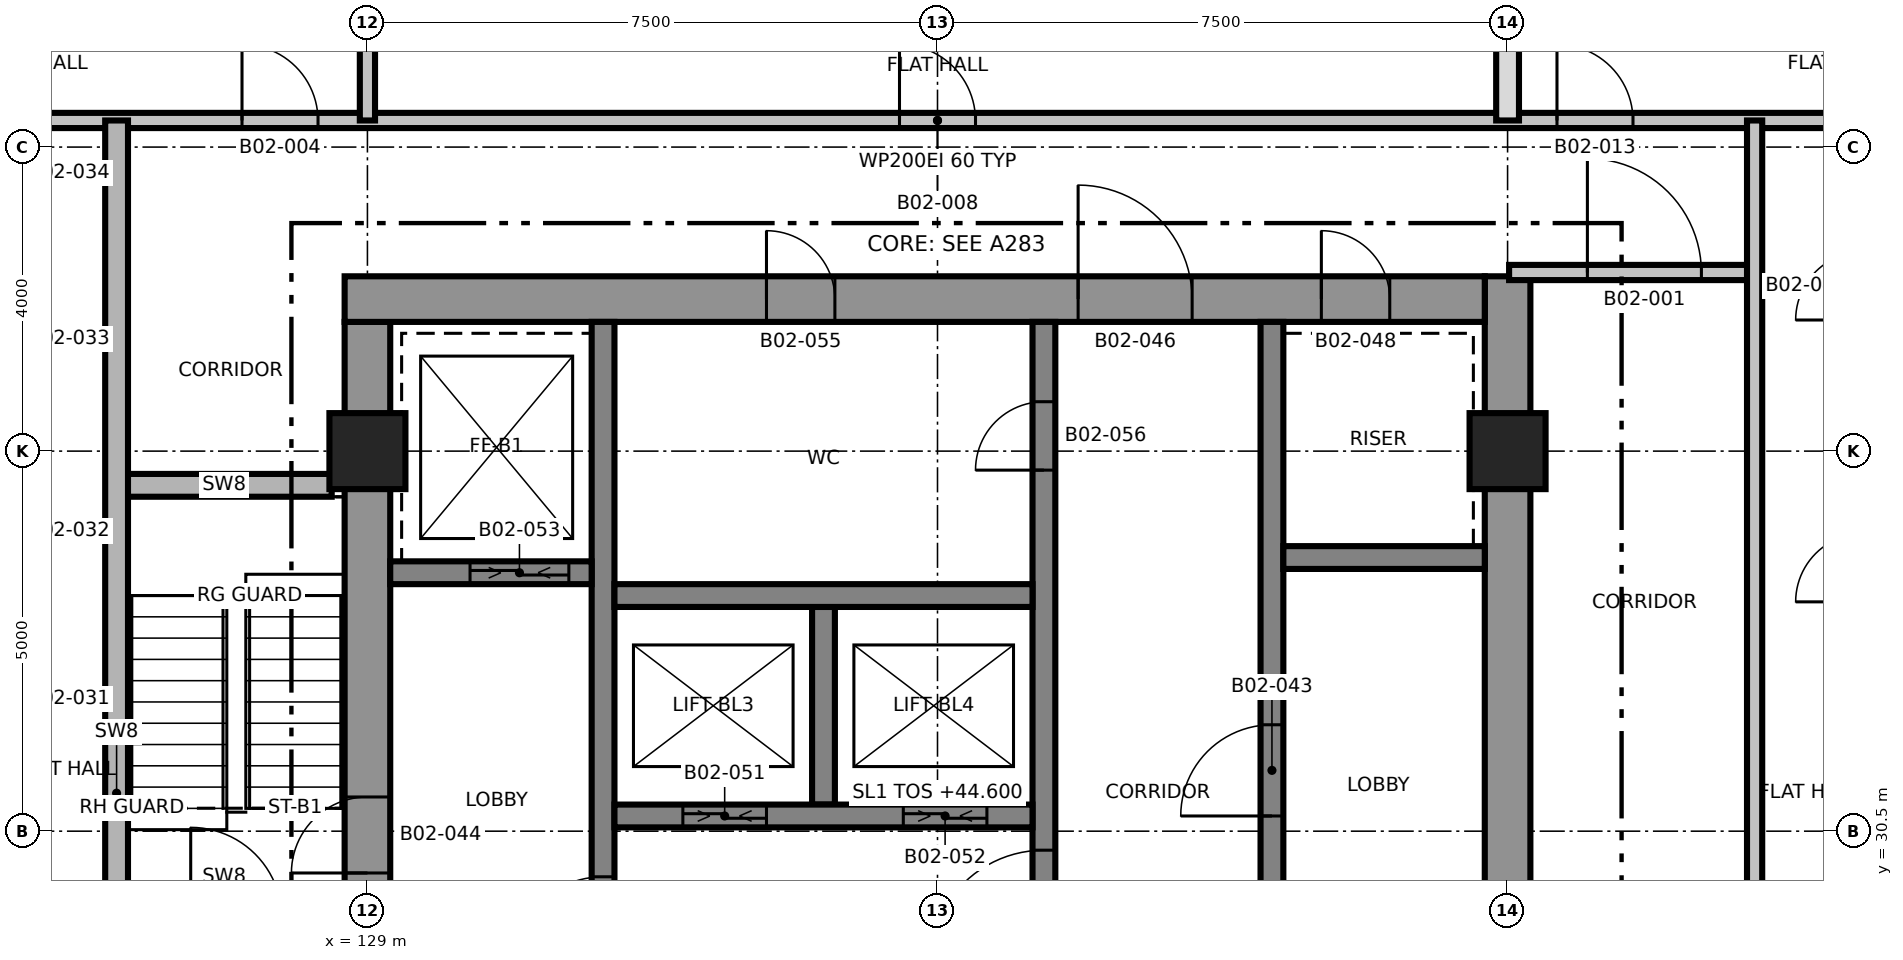
"""IFC4 building model, lengths in metres.
Left out: names, types, materials, properties, quantities, classifications, styles, units other than length and angle.
Written with IfcOpenShell. Run it as: python <this file> out.ifc"""

import sys

from ifc_helpers import new_model, si_unit, direction, frame, frame_2d, origin, origin_2d, place, context, subcontext, project, spatial, rectangle, extrude, element, fill, save


model = new_model("IFC4")
c1 = context("Model", 3, precision=1e-05, world=origin(), true_north=direction((0.0, 1.0)))
c2 = subcontext(c1, "Body", "Model", "MODEL_VIEW")
j1 = project(units=[si_unit("LENGTHUNIT", "METRE"), si_unit("PLANEANGLEUNIT", "RADIAN")], contexts=[c1])
p1 = place(None, origin())
s1 = spatial("IfcSite", under=j1, at=p1, CompositionType="ELEMENT")
p2 = place(p1, origin())
s2 = spatial("IfcBuilding", under=s1, at=p2, CompositionType="ELEMENT")
p3 = place(p2, frame((0.0, 0.0, 44.6)))
s3 = spatial("IfcBuildingStorey", under=s2, at=p3, CompositionType="ELEMENT", Elevation=44.6)
p4 = place(p3, frame((129.0, 24.8, 0.0), z_axis=(0.0, 0.0, 1.0), x_axis=(0.0, 1.0, 0.0)))
e1 = element("IfcWall", 1, at=p4, inside=s3, PredefinedType="SHEAR", context=c2, shape_type="SweptSolid", body=[
    extrude(rectangle(XDim=12.4, YDim=0.6, at=frame_2d((6.2, 0.0))), origin(), (0.0, 0.0, 1.0), 3.7),
])
p5 = place(p4, frame((5.15, 0.0, 0.0)))
e2 = element("IfcOpeningElement", 2, at=p5, cuts=e1, PredefinedType="OPENING", context=c2, shape_type="SweptSolid", body=[
    extrude(rectangle(XDim=1.0, YDim=2.1, at=frame_2d((0.5, 1.05))), frame((0.0, 0.31, 0.0), z_axis=(0.0, -1.0, 0.0), x_axis=(1.0, 0.0, 0.0)), (0.0, 0.0, 1.0), 0.62),
])
p6 = place(p3, frame((144.0, 24.2, 0.0), z_axis=(0.0, 0.0, 1.0), x_axis=(0.0, 1.0, 0.0)))
e3 = element("IfcWall", 3, at=p6, inside=s3, PredefinedType="SHEAR", context=c2, shape_type="SweptSolid", body=[
    extrude(rectangle(XDim=13.6, YDim=0.6, at=frame_2d((6.8, 0.0))), origin(), (0.0, 0.0, 1.0), 3.7),
])
p7 = place(p3, frame((128.7, 37.5, 0.0), z_axis=(0.0, 0.0, 1.0), x_axis=(1.0, 0.0, 0.0)))
e4 = element("IfcWall", 4, at=p7, inside=s3, PredefinedType="SHEAR", context=c2, shape_type="SweptSolid", body=[
    extrude(rectangle(XDim=15.0, YDim=0.6, at=frame_2d((7.5, 0.0))), origin(), (0.0, 0.0, 1.0), 3.7),
])
p8 = place(p7, frame((9.65, 0.0, 0.0)))
e5 = element("IfcOpeningElement", 5, at=p8, cuts=e4, PredefinedType="OPENING", context=c2, shape_type="SweptSolid", body=[
    extrude(rectangle(XDim=1.5, YDim=2.1, at=frame_2d((0.75, 1.05))), frame((0.0, 0.31, 0.0), z_axis=(0.0, -1.0, 0.0), x_axis=(1.0, 0.0, 0.0)), (0.0, 0.0, 1.0), 0.62),
])
p9 = place(p7, frame((12.85, 0.0, 0.0)))
e6 = element("IfcOpeningElement", 6, at=p9, cuts=e4, PredefinedType="OPENING", context=c2, shape_type="SweptSolid", body=[
    extrude(rectangle(XDim=0.9, YDim=2.1, at=frame_2d((0.45, 1.05))), frame((0.0, 0.31, 0.0), z_axis=(0.0, -1.0, 0.0), x_axis=(1.0, 0.0, 0.0)), (0.0, 0.0, 1.0), 0.62),
])
p10 = place(p7, frame((5.55, 0.0, 0.0)))
e7 = element("IfcOpeningElement", 7, at=p10, cuts=e4, PredefinedType="OPENING", context=c2, shape_type="SweptSolid", body=[
    extrude(rectangle(XDim=0.9, YDim=2.1, at=frame_2d((0.45, 1.05))), frame((0.0, 0.31, 0.0), z_axis=(0.0, -1.0, 0.0), x_axis=(1.0, 0.0, 0.0)), (0.0, 0.0, 1.0), 0.62),
])
p11 = place(p3, frame((132.1, 24.8, 0.0), z_axis=(0.0, 0.0, 1.0), x_axis=(0.0, 1.0, 0.0)))
e8 = element("IfcWall", 8, at=p11, inside=s3, PredefinedType="SHEAR", context=c2, shape_type="SweptSolid", body=[
    extrude(rectangle(XDim=12.4, YDim=0.3, at=frame_2d((6.2, 0.0))), origin(), (0.0, 0.0, 1.0), 3.7),
])
p12 = place(p11, frame((3.9, 0.0, 0.0)))
e9 = element("IfcOpeningElement", 9, at=p12, cuts=e8, PredefinedType="OPENING", context=c2, shape_type="SweptSolid", body=[
    extrude(rectangle(XDim=1.2, YDim=2.1, at=frame_2d((0.6, 1.05))), frame((0.0, 0.16, 0.0), z_axis=(0.0, -1.0, 0.0), x_axis=(1.0, 0.0, 0.0)), (0.0, 0.0, 1.0), 0.32),
])
p13 = place(p3, frame((137.9, 24.8, 0.0), z_axis=(0.0, 0.0, 1.0), x_axis=(0.0, 1.0, 0.0)))
e10 = element("IfcWall", 10, at=p13, inside=s3, PredefinedType="SHEAR", context=c2, shape_type="SweptSolid", body=[
    extrude(rectangle(XDim=12.4, YDim=0.3, at=frame_2d((6.2, 0.0))), origin(), (0.0, 0.0, 1.0), 3.7),
])
p14 = place(p13, frame((3.95, 0.0, 0.0)))
e11 = element("IfcOpeningElement", 11, at=p14, cuts=e10, PredefinedType="OPENING", context=c2, shape_type="SweptSolid", body=[
    extrude(rectangle(XDim=1.5, YDim=2.1, at=frame_2d((0.75, 1.05))), frame((0.0, 0.16, 0.0), z_axis=(0.0, -1.0, 0.0), x_axis=(1.0, 0.0, 0.0)), (0.0, 0.0, 1.0), 0.32),
])
p15 = place(p13, frame((10.45, 0.0, 0.0)))
e12 = element("IfcOpeningElement", 12, at=p15, cuts=e10, PredefinedType="OPENING", context=c2, shape_type="SweptSolid", body=[
    extrude(rectangle(XDim=0.9, YDim=2.1, at=frame_2d((0.45, 1.05))), frame((0.0, 0.16, 0.0), z_axis=(0.0, -1.0, 0.0), x_axis=(1.0, 0.0, 0.0)), (0.0, 0.0, 1.0), 0.32),
])
p16 = place(p3, frame((140.9, 24.8, 0.0), z_axis=(0.0, 0.0, 1.0), x_axis=(0.0, 1.0, 0.0)))
e13 = element("IfcWall", 13, at=p16, inside=s3, PredefinedType="SHEAR", context=c2, shape_type="SweptSolid", body=[
    extrude(rectangle(XDim=12.4, YDim=0.3, at=frame_2d((6.2, 0.0))), origin(), (0.0, 0.0, 1.0), 3.7),
])
p17 = place(p16, frame((5.9, 0.0, 0.0)))
e14 = element("IfcOpeningElement", 14, at=p17, cuts=e13, PredefinedType="OPENING", context=c2, shape_type="SweptSolid", body=[
    extrude(rectangle(XDim=1.2, YDim=2.1, at=frame_2d((0.6, 1.05))), frame((0.0, 0.16, 0.0), z_axis=(0.0, -1.0, 0.0), x_axis=(1.0, 0.0, 0.0)), (0.0, 0.0, 1.0), 0.32),
])
p18 = place(p3, frame((135.0, 30.85, 0.0), z_axis=(0.0, 0.0, 1.0), x_axis=(0.0, 1.0, 0.0)))
e15 = element("IfcWall", 15, at=p18, inside=s3, PredefinedType="SHEAR", context=c2, shape_type="SweptSolid", body=[
    extrude(rectangle(XDim=2.6, YDim=0.3, at=frame_2d((1.3, 0.0))), origin(), (0.0, 0.0, 1.0), 3.7),
])
p19 = place(p3, frame((132.25, 30.7, 0.0), z_axis=(0.0, 0.0, 1.0), x_axis=(1.0, 0.0, 0.0)))
e16 = element("IfcWall", 16, at=p19, inside=s3, PredefinedType="SHEAR", context=c2, shape_type="SweptSolid", body=[
    extrude(rectangle(XDim=5.5, YDim=0.3, at=frame_2d((2.75, 0.0))), origin(), (0.0, 0.0, 1.0), 3.7),
])
p20 = place(p19, frame((0.9, 0.0, 0.0)))
e17 = element("IfcOpeningElement", 17, at=p20, cuts=e16, PredefinedType="OPENING", context=c2, shape_type="SweptSolid", body=[
    extrude(rectangle(XDim=1.1, YDim=2.4, at=frame_2d((0.55, 1.2))), frame((0.0, 0.16, 0.0), z_axis=(0.0, -1.0, 0.0), x_axis=(1.0, 0.0, 0.0)), (0.0, 0.0, 1.0), 0.32),
])
p21 = place(p19, frame((3.8, 0.0, 0.0)))
e18 = element("IfcOpeningElement", 18, at=p21, cuts=e16, PredefinedType="OPENING", context=c2, shape_type="SweptSolid", body=[
    extrude(rectangle(XDim=1.1, YDim=2.4, at=frame_2d((0.55, 1.2))), frame((0.0, 0.16, 0.0), z_axis=(0.0, -1.0, 0.0), x_axis=(1.0, 0.0, 0.0)), (0.0, 0.0, 1.0), 0.32),
])
p22 = place(p3, frame((132.25, 33.6, 0.0), z_axis=(0.0, 0.0, 1.0), x_axis=(1.0, 0.0, 0.0)))
e19 = element("IfcWall", 19, at=p22, inside=s3, PredefinedType="SHEAR", context=c2, shape_type="SweptSolid", body=[
    extrude(rectangle(XDim=5.5, YDim=0.3, at=frame_2d((2.75, 0.0))), origin(), (0.0, 0.0, 1.0), 3.7),
])
p23 = place(p3, frame((129.3, 33.9, 0.0), z_axis=(0.0, 0.0, 1.0), x_axis=(1.0, 0.0, 0.0)))
e20 = element("IfcWall", 20, at=p23, inside=s3, PredefinedType="SHEAR", context=c2, shape_type="SweptSolid", body=[
    extrude(rectangle(XDim=2.65, YDim=0.3, at=frame_2d((1.325, 0.0))), origin(), (0.0, 0.0, 1.0), 3.7),
])
p24 = place(p23, frame((1.05, 0.0, 0.0)))
e21 = element("IfcOpeningElement", 21, at=p24, cuts=e20, PredefinedType="OPENING", context=c2, shape_type="SweptSolid", body=[
    extrude(rectangle(XDim=1.3, YDim=2.4, at=frame_2d((0.65, 1.2))), frame((0.0, 0.16, 0.0), z_axis=(0.0, -1.0, 0.0), x_axis=(1.0, 0.0, 0.0)), (0.0, 0.0, 1.0), 0.32),
])
p25 = place(p3, frame((141.05, 34.1, 0.0), z_axis=(0.0, 0.0, 1.0), x_axis=(1.0, 0.0, 0.0)))
e22 = element("IfcWall", 22, at=p25, inside=s3, PredefinedType="SHEAR", context=c2, shape_type="SweptSolid", body=[
    extrude(rectangle(XDim=2.65, YDim=0.3, at=frame_2d((1.325, 0.0))), origin(), (0.0, 0.0, 1.0), 3.7),
])
for number, where, z_axis, x_axis in (
    (23, (129.0, 35.5, 0.0), (0.0, 0.0, 1.0), (1.0, 0.0, 0.0)),
    (24, (144.0, 35.5, 0.0), (0.0, 0.0, 1.0), (1.0, 0.0, 0.0)),
):
    element("IfcColumn", number, at=place(p3, frame(where, z_axis=z_axis, x_axis=x_axis)), inside=s3, PredefinedType="COLUMN", context=c2, shape_type="SweptSolid", body=[
        extrude(rectangle(XDim=1.0, YDim=1.0, at=origin_2d()), origin(), (0.0, 0.0, 1.0), 3.7),
    ])
p26 = place(p3, frame((125.7, 35.05, 0.0), z_axis=(0.0, 0.0, 1.0), x_axis=(1.0, 0.0, 0.0)))
e25 = element("IfcWall", 25, at=p26, inside=s3, PredefinedType="SHEAR", context=c2, shape_type="SweptSolid", body=[
    extrude(rectangle(XDim=2.83, YDim=0.3, at=frame_2d((1.415, 0.0))), origin(), (0.0, 0.0, 1.0), 3.4),
])
p27 = place(p3, frame((144.02, 37.85, 0.0), z_axis=(0.0, 0.0, 1.0), x_axis=(1.0, 0.0, 0.0)))
e26 = element("IfcWall", 26, at=p27, inside=s3, PredefinedType="PARTITIONING", context=c2, shape_type="SweptSolid", body=[
    extrude(rectangle(XDim=3.23, YDim=0.2, at=frame_2d((1.615, 0.0))), origin(), (0.0, 0.0, 1.0), 3.4),
])
p28 = place(p27, frame((1.03, 0.0, 0.0)))
e27 = element("IfcOpeningElement", 27, at=p28, cuts=e26, PredefinedType="OPENING", context=c2, shape_type="SweptSolid", body=[
    extrude(rectangle(XDim=1.5, YDim=2.1, at=frame_2d((0.75, 1.05))), frame((0.0, 0.11, 0.0), z_axis=(0.0, -1.0, 0.0), x_axis=(1.0, 0.0, 0.0)), (0.0, 0.0, 1.0), 0.22),
])
p29 = place(p3, frame((120.235, 39.85, 0.0), z_axis=(0.0, 0.0, 1.0), x_axis=(1.0, 0.0, 0.0)))
e28 = element("IfcWall", 28, at=p29, inside=s3, PredefinedType="PARTITIONING", context=c2, shape_type="SweptSolid", body=[
    extrude(rectangle(XDim=32.53, YDim=0.2, at=frame_2d((16.265, 0.0))), origin(), (0.0, 0.0, 1.0), 3.4),
])
p30 = place(p29, frame((7.115, 0.0, 0.0)))
e29 = element("IfcOpeningElement", 29, at=p30, cuts=e28, PredefinedType="OPENING", context=c2, shape_type="SweptSolid", body=[
    extrude(rectangle(XDim=1.0, YDim=2.1, at=frame_2d((0.5, 1.05))), frame((0.0, 0.11, 0.0), z_axis=(0.0, -1.0, 0.0), x_axis=(1.0, 0.0, 0.0)), (0.0, 0.0, 1.0), 0.22),
])
p31 = place(p29, frame((15.765, 0.0, 0.0)))
e30 = element("IfcOpeningElement", 30, at=p31, cuts=e28, PredefinedType="OPENING", context=c2, shape_type="SweptSolid", body=[
    extrude(rectangle(XDim=1.0, YDim=2.1, at=frame_2d((0.5, 1.05))), frame((0.0, 0.11, 0.0), z_axis=(0.0, -1.0, 0.0), x_axis=(1.0, 0.0, 0.0)), (0.0, 0.0, 1.0), 0.22),
])
p32 = place(p29, frame((24.415, 0.0, 0.0)))
e31 = element("IfcOpeningElement", 31, at=p32, cuts=e28, PredefinedType="OPENING", context=c2, shape_type="SweptSolid", body=[
    extrude(rectangle(XDim=1.0, YDim=2.1, at=frame_2d((0.5, 1.05))), frame((0.0, 0.11, 0.0), z_axis=(0.0, -1.0, 0.0), x_axis=(1.0, 0.0, 0.0)), (0.0, 0.0, 1.0), 0.22),
])
p33 = place(p3, frame((125.7, 22.15, 0.0), z_axis=(0.0, 0.0, 1.0), x_axis=(0.0, 1.0, 0.0)))
e32 = element("IfcWall", 32, at=p33, inside=s3, PredefinedType="SHEAR", context=c2, shape_type="SweptSolid", body=[
    extrude(rectangle(XDim=17.7, YDim=0.3, at=frame_2d((8.85, 0.0))), origin(), (0.0, 0.0, 1.0), 3.4),
])
p34 = place(p33, frame((2.7, 0.0, 0.0)))
e33 = element("IfcOpeningElement", 33, at=p34, cuts=e32, PredefinedType="OPENING", context=c2, shape_type="SweptSolid", body=[
    extrude(rectangle(XDim=1.0, YDim=2.1, at=frame_2d((0.5, 1.05))), frame((0.0, 0.16, 0.0), z_axis=(0.0, -1.0, 0.0), x_axis=(1.0, 0.0, 0.0)), (0.0, 0.0, 1.0), 0.32),
])
p35 = place(p3, frame((129.0, 39.85, 0.0), z_axis=(0.0, 0.0, 1.0), x_axis=(0.0, 1.0, 0.0)))
e34 = element("IfcWall", 34, at=p35, inside=s3, PredefinedType="PARTITIONING", context=c2, shape_type="SweptSolid", body=[
    extrude(rectangle(XDim=5.915, YDim=0.2, at=frame_2d((2.958, 0.0))), origin(), (0.0, 0.0, 1.0), 3.4),
])
p36 = place(p3, frame((144.0, 39.85, 0.0), z_axis=(0.0, 0.0, 1.0), x_axis=(0.0, 1.0, 0.0)))
e35 = element("IfcWall", 35, at=p36, inside=s3, PredefinedType="PARTITIONING", context=c2, shape_type="SweptSolid", body=[
    extrude(rectangle(XDim=5.915, YDim=0.3, at=frame_2d((2.958, 0.0))), origin(), (0.0, 0.0, 1.0), 3.4),
])
p37 = place(p3, frame((147.25, 22.15, 0.0), z_axis=(0.0, 0.0, 1.0), x_axis=(0.0, 1.0, 0.0)))
e36 = element("IfcWall", 36, at=p37, inside=s3, PredefinedType="PARTITIONING", context=c2, shape_type="SweptSolid", body=[
    extrude(rectangle(XDim=17.7, YDim=0.2, at=frame_2d((8.85, 0.0))), origin(), (0.0, 0.0, 1.0), 3.4),
])
p38 = place(p37, frame((2.65, 0.0, 0.0)))
e37 = element("IfcOpeningElement", 37, at=p38, cuts=e36, PredefinedType="OPENING", context=c2, shape_type="SweptSolid", body=[
    extrude(rectangle(XDim=1.0, YDim=2.1, at=frame_2d((0.5, 1.05))), frame((0.0, 0.11, 0.0), z_axis=(0.0, -1.0, 0.0), x_axis=(1.0, 0.0, 0.0)), (0.0, 0.0, 1.0), 0.22),
])
p39 = place(p28, origin())
e38 = element("IfcDoor", 38, at=p39, inside=s3, OperationType="SINGLE_SWING_LEFT", PredefinedType="DOOR", context=c2, shape_type="SweptSolid", body=[
    extrude(rectangle(XDim=1.5, YDim=2.1, at=frame_2d((0.75, 1.05))), frame((0.0, 0.025, 0.0), z_axis=(0.0, -1.0, 0.0), x_axis=(1.0, 0.0, 0.0)), (0.0, 0.0, 1.0), 0.05),
])
fill(e27, e38)
p40 = place(p30, origin())
e39 = element("IfcDoor", 39, at=p40, inside=s3, OperationType="SINGLE_SWING_RIGHT", PredefinedType="DOOR", context=c2, shape_type="SweptSolid", body=[
    extrude(rectangle(XDim=1.0, YDim=2.1, at=frame_2d((0.5, 1.05))), frame((0.0, 0.025, 0.0), z_axis=(0.0, -1.0, 0.0), x_axis=(1.0, 0.0, 0.0)), (0.0, 0.0, 1.0), 0.05),
])
fill(e29, e39)
p41 = place(p31, origin())
e40 = element("IfcDoor", 40, at=p41, inside=s3, OperationType="SINGLE_SWING_RIGHT", PredefinedType="DOOR", context=c2, shape_type="SweptSolid", body=[
    extrude(rectangle(XDim=1.0, YDim=2.1, at=frame_2d((0.5, 1.05))), frame((0.0, 0.025, 0.0), z_axis=(0.0, -1.0, 0.0), x_axis=(1.0, 0.0, 0.0)), (0.0, 0.0, 1.0), 0.05),
])
fill(e30, e40)
p42 = place(p32, origin())
e41 = element("IfcDoor", 41, at=p42, inside=s3, OperationType="SINGLE_SWING_LEFT", PredefinedType="DOOR", context=c2, shape_type="SweptSolid", body=[
    extrude(rectangle(XDim=1.0, YDim=2.1, at=frame_2d((0.5, 1.05))), frame((0.0, 0.025, 0.0), z_axis=(0.0, -1.0, 0.0), x_axis=(1.0, 0.0, 0.0)), (0.0, 0.0, 1.0), 0.05),
])
fill(e31, e41)
p43 = place(p14, origin())
e42 = element("IfcDoor", 42, at=p43, inside=s3, OperationType="SINGLE_SWING_RIGHT", PredefinedType="DOOR", context=c2, shape_type="SweptSolid", body=[
    extrude(rectangle(XDim=1.5, YDim=2.1, at=frame_2d((0.75, 1.05))), frame((0.0, 0.025, 0.0), z_axis=(0.0, -1.0, 0.0), x_axis=(1.0, 0.0, 0.0)), (0.0, 0.0, 1.0), 0.05),
])
fill(e11, e42)
p44 = place(p12, origin())
e43 = element("IfcDoor", 43, at=p44, inside=s3, OperationType="SINGLE_SWING_LEFT", PredefinedType="DOOR", context=c2, shape_type="SweptSolid", body=[
    extrude(rectangle(XDim=1.2, YDim=2.1, at=frame_2d((0.6, 1.05))), frame((0.0, 0.025, 0.0), z_axis=(0.0, -1.0, 0.0), x_axis=(1.0, 0.0, 0.0)), (0.0, 0.0, 1.0), 0.05),
])
fill(e9, e43)
p45 = place(p17, origin())
e44 = element("IfcDoor", 44, at=p45, inside=s3, OperationType="SINGLE_SWING_RIGHT", PredefinedType="DOOR", context=c2, shape_type="SweptSolid", body=[
    extrude(rectangle(XDim=1.2, YDim=2.1, at=frame_2d((0.6, 1.05))), frame((0.0, 0.025, 0.0), z_axis=(0.0, -1.0, 0.0), x_axis=(1.0, 0.0, 0.0)), (0.0, 0.0, 1.0), 0.05),
])
fill(e14, e44)
p46 = place(p5, origin())
e45 = element("IfcDoor", 45, at=p46, inside=s3, OperationType="SINGLE_SWING_RIGHT", PredefinedType="DOOR", context=c2, shape_type="SweptSolid", body=[
    extrude(rectangle(XDim=1.0, YDim=2.1, at=frame_2d((0.5, 1.05))), frame((0.0, 0.025, 0.0), z_axis=(0.0, -1.0, 0.0), x_axis=(1.0, 0.0, 0.0)), (0.0, 0.0, 1.0), 0.05),
])
fill(e2, e45)
p47 = place(p8, origin())
e46 = element("IfcDoor", 46, at=p47, inside=s3, OperationType="SINGLE_SWING_RIGHT", PredefinedType="DOOR", context=c2, shape_type="SweptSolid", body=[
    extrude(rectangle(XDim=1.5, YDim=2.1, at=frame_2d((0.75, 1.05))), frame((0.0, 0.025, 0.0), z_axis=(0.0, -1.0, 0.0), x_axis=(1.0, 0.0, 0.0)), (0.0, 0.0, 1.0), 0.05),
])
fill(e5, e46)
p48 = place(p9, origin())
e47 = element("IfcDoor", 47, at=p48, inside=s3, OperationType="SINGLE_SWING_RIGHT", PredefinedType="DOOR", context=c2, shape_type="SweptSolid", body=[
    extrude(rectangle(XDim=0.9, YDim=2.1, at=frame_2d((0.45, 1.05))), frame((0.0, 0.025, 0.0), z_axis=(0.0, -1.0, 0.0), x_axis=(1.0, 0.0, 0.0)), (0.0, 0.0, 1.0), 0.05),
])
fill(e6, e47)
p49 = place(p20, origin())
e48 = element("IfcDoor", 48, at=p49, inside=s3, OperationType="SLIDING_TO_LEFT", PredefinedType="DOOR", context=c2, shape_type="SweptSolid", body=[
    extrude(rectangle(XDim=1.1, YDim=2.4, at=frame_2d((0.55, 1.2))), frame((0.0, 0.025, 0.0), z_axis=(0.0, -1.0, 0.0), x_axis=(1.0, 0.0, 0.0)), (0.0, 0.0, 1.0), 0.05),
])
fill(e17, e48)
p50 = place(p21, origin())
e49 = element("IfcDoor", 49, at=p50, inside=s3, OperationType="SLIDING_TO_LEFT", PredefinedType="DOOR", context=c2, shape_type="SweptSolid", body=[
    extrude(rectangle(XDim=1.1, YDim=2.4, at=frame_2d((0.55, 1.2))), frame((0.0, 0.025, 0.0), z_axis=(0.0, -1.0, 0.0), x_axis=(1.0, 0.0, 0.0)), (0.0, 0.0, 1.0), 0.05),
])
fill(e18, e49)
p51 = place(p24, origin())
e50 = element("IfcDoor", 50, at=p51, inside=s3, OperationType="SLIDING_TO_LEFT", PredefinedType="DOOR", context=c2, shape_type="SweptSolid", body=[
    extrude(rectangle(XDim=1.3, YDim=2.4, at=frame_2d((0.65, 1.2))), frame((0.0, 0.025, 0.0), z_axis=(0.0, -1.0, 0.0), x_axis=(1.0, 0.0, 0.0)), (0.0, 0.0, 1.0), 0.05),
])
fill(e21, e50)
p52 = place(p10, origin())
e51 = element("IfcDoor", 51, at=p52, inside=s3, OperationType="SINGLE_SWING_LEFT", PredefinedType="DOOR", context=c2, shape_type="SweptSolid", body=[
    extrude(rectangle(XDim=0.9, YDim=2.1, at=frame_2d((0.45, 1.05))), frame((0.0, 0.025, 0.0), z_axis=(0.0, -1.0, 0.0), x_axis=(1.0, 0.0, 0.0)), (0.0, 0.0, 1.0), 0.05),
])
fill(e7, e51)
p53 = place(p15, origin())
e52 = element("IfcDoor", 52, at=p53, inside=s3, OperationType="SINGLE_SWING_RIGHT", PredefinedType="DOOR", context=c2, shape_type="SweptSolid", body=[
    extrude(rectangle(XDim=0.9, YDim=2.1, at=frame_2d((0.45, 1.05))), frame((0.0, 0.025, 0.0), z_axis=(0.0, -1.0, 0.0), x_axis=(1.0, 0.0, 0.0)), (0.0, 0.0, 1.0), 0.05),
])
fill(e12, e52)
save(model, sys.argv[1])
